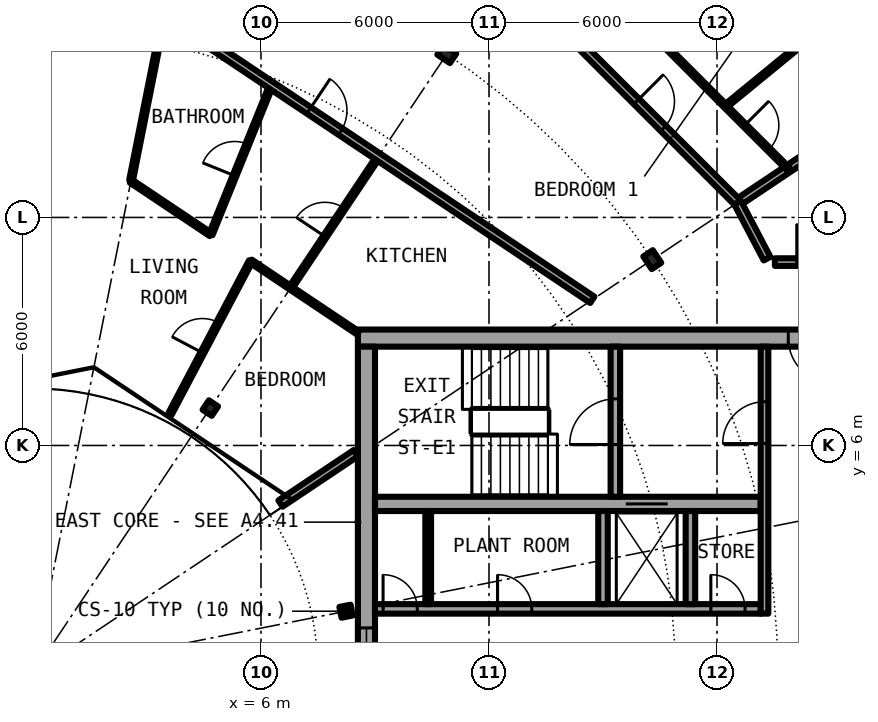
"""IFC4 building model, lengths in metres.
Left out: names, types, materials, properties, quantities, classifications, styles, units other than length and angle.
Written with IfcOpenShell. Run it as: python <this file> out.ifc"""

import sys

from ifc_helpers import new_model, si_unit, direction, frame, frame_2d, origin, origin_2d, place, context, subcontext, project, spatial, rectangle, i_section, extrude, element, fill, save


model = new_model("IFC4")
c1 = context("Model", 3, precision=1e-05, world=origin(), true_north=direction((0.0, 1.0)))
c2 = subcontext(c1, "Body", "Model", "MODEL_VIEW")
j1 = project(units=[si_unit("LENGTHUNIT", "METRE"), si_unit("PLANEANGLEUNIT", "RADIAN")], contexts=[c1])
p1 = place(None, origin())
s1 = spatial("IfcSite", under=j1, at=p1, CompositionType="ELEMENT")
p2 = place(p1, origin())
s2 = spatial("IfcBuilding", under=s1, at=p2, CompositionType="ELEMENT")
p3 = place(p2, frame((0.0, 0.0, 218.8)))
s3 = spatial("IfcBuildingStorey", under=s2, at=p3, CompositionType="ELEMENT", Elevation=218.8)
for number, where, z_axis, x_axis in (
    (1, (16.297, 10.889, 0.0), (0.0, 0.0, 1.0), (0.831, 0.556, 0.0)),
    (2, (10.889, 16.297, 0.0), (0.0, 0.0, 1.0), (0.556, 0.831, 0.0)),
):
    element("IfcColumn", number, at=place(p3, frame(where, z_axis=z_axis, x_axis=x_axis)), inside=s3, PredefinedType="COLUMN", context=c2, shape_type="SweptSolid", body=[
        extrude(i_section(OverallWidth=0.3, OverallDepth=0.4, WebThickness=0.013, FlangeThickness=0.024, FilletRadius=0.027, at=origin_2d()), origin(), (0.0, 0.0, 1.0), 3.05),
    ])
for number, where, z_axis, x_axis in (
    (3, (8.239, 1.639, 0.0), (0.0, 0.0, 1.0), (0.981, 0.195, 0.0)),
    (4, (4.667, 6.984, 0.0), (0.0, 0.0, 1.0), (0.556, 0.831, 0.0)),
):
    element("IfcColumn", number, at=place(p3, frame(where, z_axis=z_axis, x_axis=x_axis)), inside=s3, PredefinedType="COLUMN", context=c2, shape_type="SweptSolid", body=[
        extrude(i_section(OverallWidth=0.3, OverallDepth=0.29, WebThickness=0.009, FlangeThickness=0.014, FilletRadius=0.027, at=origin_2d()), origin(), (0.0, 0.0, 1.0), 3.05),
    ])
p4 = place(p3, frame((22.699, 15.167, 0.0), z_axis=(0.0, 0.0, 1.0), x_axis=(-0.634382322723, 0.773019449054, 0.0)))
e5 = element("IfcWall", 5, at=p4, inside=s3, PredefinedType="SOLIDWALL", context=c2, shape_type="SweptSolid", body=[
    extrude(rectangle(XDim=5.352, YDim=0.25, at=frame_2d((2.676, 0.0))), origin(), (0.0, 0.0, 1.0), 2.65),
])
p5 = place(p4, frame((0.841, 0.0, 0.0)))
e6 = element("IfcOpeningElement", 6, at=p5, cuts=e5, PredefinedType="OPENING", context=c2, shape_type="SweptSolid", body=[
    extrude(rectangle(XDim=1.0, YDim=2.2, at=frame_2d((0.5, 1.1))), frame((0.0, 0.135, 0.0), z_axis=(0.0, -1.0, 0.0), x_axis=(1.0, 0.0, 0.0)), (0.0, 0.0, 1.0), 0.27),
])
p6 = place(p4, frame((3.111, 0.0, 0.3)))
e7 = element("IfcOpeningElement", 7, at=p6, cuts=e5, PredefinedType="OPENING", context=c2, shape_type="SweptSolid", body=[
    extrude(rectangle(XDim=1.8, YDim=2.1, at=frame_2d((0.9, 1.05))), frame((0.0, 0.135, 0.0), z_axis=(0.0, -1.0, 0.0), x_axis=(1.0, 0.0, 0.0)), (0.0, 0.0, 1.0), 0.27),
])
p7 = place(p3, frame((22.05, 8.825, 0.0), z_axis=(0.0, 0.0, 1.0), x_axis=(-1.0, 0.0, 0.0)))
e8 = element("IfcWall", 8, at=p7, inside=s3, PredefinedType="SHEAR", context=c2, shape_type="SweptSolid", body=[
    extrude(rectangle(XDim=13.5, YDim=0.45, at=frame_2d((6.75, 0.0))), origin(), (0.0, 0.0, 1.0), 3.05),
])
p8 = place(p7, frame((0.975, 0.0, 0.0)))
e9 = element("IfcOpeningElement", 9, at=p8, cuts=e8, PredefinedType="OPENING", context=c2, shape_type="SweptSolid", body=[
    extrude(rectangle(XDim=1.2, YDim=2.3, at=frame_2d((0.6, 1.15))), frame((0.0, 0.235, 0.0), z_axis=(0.0, -1.0, 0.0), x_axis=(1.0, 0.0, 0.0)), (0.0, 0.0, 1.0), 0.47),
])
p9 = place(p3, frame((8.775, -8.6, 0.0), z_axis=(0.0, 0.0, 1.0), x_axis=(0.0, 1.0, 0.0)))
e10 = element("IfcWall", 10, at=p9, inside=s3, PredefinedType="SHEAR", context=c2, shape_type="SweptSolid", body=[
    extrude(rectangle(XDim=17.2, YDim=0.45, at=frame_2d((8.6, 0.0))), origin(), (0.0, 0.0, 1.0), 3.05),
])
p10 = place(p9, frame((7.4, 0.0, 0.1)))
e11 = element("IfcOpeningElement", 11, at=p10, cuts=e10, PredefinedType="OPENING", context=c2, shape_type="SweptSolid", body=[
    extrude(rectangle(XDim=2.4, YDim=2.2, at=frame_2d((1.2, 1.1))), frame((0.0, 0.235, 0.0), z_axis=(0.0, -1.0, 0.0), x_axis=(1.0, 0.0, 0.0)), (0.0, 0.0, 1.0), 0.47),
])
p11 = place(p3, frame((9.0, 1.7, 0.0), z_axis=(0.0, 0.0, 1.0), x_axis=(1.0, 0.0, 0.0)))
e12 = element("IfcWall", 12, at=p11, inside=s3, PredefinedType="SHEAR", context=c2, shape_type="SweptSolid", body=[
    extrude(rectangle(XDim=10.15, YDim=0.25, at=frame_2d((5.075, 0.0))), origin(), (0.0, 0.0, 1.0), 3.05),
])
p12 = place(p11, frame((0.212, 0.0, 0.0)))
e13 = element("IfcOpeningElement", 13, at=p12, cuts=e12, PredefinedType="OPENING", context=c2, shape_type="SweptSolid", body=[
    extrude(rectangle(XDim=0.9, YDim=2.3, at=frame_2d((0.45, 1.15))), frame((0.0, 0.135, 0.0), z_axis=(0.0, -1.0, 0.0), x_axis=(1.0, 0.0, 0.0)), (0.0, 0.0, 1.0), 0.27),
])
p13 = place(p11, frame((3.225, 0.0, 0.0)))
e14 = element("IfcOpeningElement", 14, at=p13, cuts=e12, PredefinedType="OPENING", context=c2, shape_type="SweptSolid", body=[
    extrude(rectangle(XDim=0.9, YDim=2.3, at=frame_2d((0.45, 1.15))), frame((0.0, 0.135, 0.0), z_axis=(0.0, -1.0, 0.0), x_axis=(1.0, 0.0, 0.0)), (0.0, 0.0, 1.0), 0.27),
])
p14 = place(p11, frame((8.837, 0.0, 0.0)))
e15 = element("IfcOpeningElement", 15, at=p14, cuts=e12, PredefinedType="OPENING", context=c2, shape_type="SweptSolid", body=[
    extrude(rectangle(XDim=0.9, YDim=2.3, at=frame_2d((0.45, 1.15))), frame((0.0, 0.135, 0.0), z_axis=(0.0, -1.0, 0.0), x_axis=(1.0, 0.0, 0.0)), (0.0, 0.0, 1.0), 0.27),
])
p15 = place(p3, frame((9.0, 4.462, 0.0), z_axis=(0.0, 0.0, 1.0), x_axis=(1.0, 0.0, 0.0)))
e16 = element("IfcWall", 16, at=p15, inside=s3, PredefinedType="SHEAR", context=c2, shape_type="SweptSolid", body=[
    extrude(rectangle(XDim=10.15, YDim=0.375, at=frame_2d((5.075, 0.0))), origin(), (0.0, 0.0, 1.0), 3.05),
])
p16 = place(p15, frame((6.6, 0.0, 0.0)))
e17 = element("IfcOpeningElement", 17, at=p16, cuts=e16, PredefinedType="OPENING", context=c2, shape_type="SweptSolid", body=[
    extrude(rectangle(XDim=1.1, YDim=2.3, at=frame_2d((0.55, 1.15))), frame((0.0, 0.198, 0.0), z_axis=(0.0, -1.0, 0.0), x_axis=(1.0, 0.0, 0.0)), (0.0, 0.0, 1.0), 0.395),
])
p17 = place(p3, frame((15.325, 4.65, 0.0), z_axis=(0.0, 0.0, 1.0), x_axis=(0.0, 1.0, 0.0)))
e18 = element("IfcWall", 18, at=p17, inside=s3, PredefinedType="SHEAR", context=c2, shape_type="SweptSolid", body=[
    extrude(rectangle(XDim=3.95, YDim=0.25, at=frame_2d((1.975, 0.0))), origin(), (0.0, 0.0, 1.0), 3.05),
])
p18 = place(p17, frame((1.375, 0.0, 0.0)))
e19 = element("IfcOpeningElement", 19, at=p18, cuts=e18, PredefinedType="OPENING", context=c2, shape_type="SweptSolid", body=[
    extrude(rectangle(XDim=1.2, YDim=2.3, at=frame_2d((0.6, 1.15))), frame((0.0, 0.135, 0.0), z_axis=(0.0, -1.0, 0.0), x_axis=(1.0, 0.0, 0.0)), (0.0, 0.0, 1.0), 0.27),
])
for number, where, z_axis, x_axis in (
    (20, (15.0, 1.825, 0.0), (0.0, 0.0, 1.0), (0.0, 1.0, 0.0)),
    (21, (17.3, 1.825, 0.0), (0.0, 0.0, 1.0), (0.0, 1.0, 0.0)),
):
    element("IfcWall", number, at=place(p3, frame(where, z_axis=z_axis, x_axis=x_axis)), inside=s3, PredefinedType="SOLIDWALL", context=c2, shape_type="SweptSolid", body=[
        extrude(rectangle(XDim=2.45, YDim=0.25, at=frame_2d((1.225, 0.0))), origin(), (0.0, 0.0, 1.0), 2.65),
    ])
p19 = place(p3, frame((19.25, 1.575, 0.0), z_axis=(0.0, 0.0, 1.0), x_axis=(0.0, 1.0, 0.0)))
e22 = element("IfcWall", 22, at=p19, inside=s3, PredefinedType="SOLIDWALL", context=c2, shape_type="SweptSolid", body=[
    extrude(rectangle(XDim=7.025, YDim=0.2, at=frame_2d((3.513, 0.0))), origin(), (0.0, 0.0, 1.0), 2.65),
])
p20 = place(p19, frame((4.475, 0.0, 0.0)))
e23 = element("IfcOpeningElement", 23, at=p20, cuts=e22, PredefinedType="OPENING", context=c2, shape_type="SweptSolid", body=[
    extrude(rectangle(XDim=1.1, YDim=2.3, at=frame_2d((0.55, 1.15))), frame((0.0, 0.11, 0.0), z_axis=(0.0, -1.0, 0.0), x_axis=(1.0, 0.0, 0.0)), (0.0, 0.0, 1.0), 0.22),
])
p21 = place(p3, frame((10.4, 1.825, 0.0), z_axis=(0.0, 0.0, 1.0), x_axis=(0.0, 1.0, 0.0)))
e24 = element("IfcWall", 24, at=p21, inside=s3, PredefinedType="PARTITIONING", context=c2, shape_type="SweptSolid", body=[
    extrude(rectangle(XDim=2.45, YDim=0.15, at=frame_2d((1.225, 0.0))), origin(), (0.0, 0.0, 1.0), 2.65),
])
p22 = place(p3, frame((3.605, 6.827, 0.0), z_axis=(0.0, 0.0, 1.0), x_axis=(0.466962677975, 0.884277025246, 0.0)))
e25 = element("IfcWall", 25, at=p22, inside=s3, PredefinedType="PARTITIONING", context=c2, shape_type="SweptSolid", body=[
    extrude(rectangle(XDim=4.549, YDim=0.1, at=frame_2d((2.274, 0.0))), origin(), (0.0, 0.0, 1.0), 2.65),
])
p23 = place(p22, frame((1.824, 0.0, 0.0)))
e26 = element("IfcOpeningElement", 26, at=p23, cuts=e25, PredefinedType="OPENING", context=c2, shape_type="SweptSolid", body=[
    extrude(rectangle(XDim=0.9, YDim=2.3, at=frame_2d((0.45, 1.15))), frame((0.0, 0.06, 0.0), z_axis=(0.0, -1.0, 0.0), x_axis=(1.0, 0.0, 0.0)), (0.0, 0.0, 1.0), 0.12),
])
p24 = place(p3, frame((4.678, 11.551, 0.0), z_axis=(0.0, 0.0, 1.0), x_axis=(0.375509828455, 0.926818411952, 0.0)))
e27 = element("IfcWall", 27, at=p24, inside=s3, PredefinedType="PARTITIONING", context=c2, shape_type="SweptSolid", body=[
    extrude(rectangle(XDim=4.237, YDim=0.1, at=frame_2d((2.119, 0.0))), origin(), (0.0, 0.0, 1.0), 2.65),
])
p25 = place(p24, frame((1.669, 0.0, 0.0)))
e28 = element("IfcOpeningElement", 28, at=p25, cuts=e27, PredefinedType="OPENING", context=c2, shape_type="SweptSolid", body=[
    extrude(rectangle(XDim=0.9, YDim=2.3, at=frame_2d((0.45, 1.15))), frame((0.0, 0.06, 0.0), z_axis=(0.0, -1.0, 0.0), x_axis=(1.0, 0.0, 0.0)), (0.0, 0.0, 1.0), 0.12),
])
p26 = place(p3, frame((6.78, 10.147, 0.0), z_axis=(0.0, 0.0, 1.0), x_axis=(0.555528237031, 0.831497671591, 0.0)))
e29 = element("IfcWall", 29, at=p26, inside=s3, PredefinedType="PARTITIONING", context=c2, shape_type="SweptSolid", body=[
    extrude(rectangle(XDim=4.149, YDim=0.1, at=frame_2d((2.075, 0.0))), origin(), (0.0, 0.0, 1.0), 2.65),
])
p27 = place(p26, frame((1.625, 0.0, 0.0)))
e30 = element("IfcOpeningElement", 30, at=p27, cuts=e29, PredefinedType="OPENING", context=c2, shape_type="SweptSolid", body=[
    extrude(rectangle(XDim=0.9, YDim=2.3, at=frame_2d((0.45, 1.15))), frame((0.0, 0.06, 0.0), z_axis=(0.0, -1.0, 0.0), x_axis=(1.0, 0.0, 0.0)), (0.0, 0.0, 1.0), 0.12),
])
p28 = place(p3, frame((18.224, 14.927, 0.0), z_axis=(0.0, 0.0, 1.0), x_axis=(0.773548271597, 0.633737383709, 0.0)))
e31 = element("IfcWall", 31, at=p28, inside=s3, PredefinedType="PARTITIONING", context=c2, shape_type="SweptSolid", body=[
    extrude(rectangle(XDim=3.618, YDim=0.1, at=frame_2d((1.809, 0.0))), origin(), (0.0, 0.0, 1.0), 2.65),
])
p29 = place(p3, frame((18.542, 12.389, 0.0), z_axis=(0.0, 0.0, 1.0), x_axis=(0.831387096605, 0.55569370664, 0.0)))
e32 = element("IfcWall", 32, at=p29, inside=s3, PredefinedType="PARTITIONING", context=c2, shape_type="SweptSolid", body=[
    extrude(rectangle(XDim=4.875, YDim=0.2, at=frame_2d((2.438, 0.0))), origin(), (0.0, 0.0, 1.0), 2.65),
])
p30 = place(p3, frame((6.513, 4.472, 0.0), z_axis=(0.0, 0.0, 1.0), x_axis=(0.831403409976, 0.555669299026, 0.0)))
e33 = element("IfcWall", 33, at=p30, inside=s3, PredefinedType="PARTITIONING", context=c2, shape_type="SweptSolid", body=[
    extrude(rectangle(XDim=2.383, YDim=0.2, at=frame_2d((1.191, 0.0))), origin(), (0.0, 0.0, 1.0), 2.65),
])
p31 = place(p3, frame((19.523, 10.825, 0.0), z_axis=(0.0, 0.0, 1.0), x_axis=(1.0, 0.0, 0.0)))
e34 = element("IfcWall", 34, at=p31, inside=s3, PredefinedType="PARTITIONING", context=c2, shape_type="SweptSolid", body=[
    extrude(rectangle(XDim=2.152, YDim=0.2, at=frame_2d((1.076, 0.0))), origin(), (0.0, 0.0, 1.0), 2.65),
])
p32 = place(p31, frame((0.576, 0.0, 0.0)))
e35 = element("IfcOpeningElement", 35, at=p32, cuts=e34, PredefinedType="OPENING", context=c2, shape_type="SweptSolid", body=[
    extrude(rectangle(XDim=1.0, YDim=2.3, at=frame_2d((0.5, 1.15))), frame((0.0, 0.11, 0.0), z_axis=(0.0, -1.0, 0.0), x_axis=(1.0, 0.0, 0.0)), (0.0, 0.0, 1.0), 0.22),
])
p33 = place(p3, frame((2.577, 12.955, 0.0), z_axis=(0.0, 0.0, 1.0), x_axis=(0.831440395268, -0.555613956912, 0.0)))
e36 = element("IfcWall", 36, at=p33, inside=s3, PredefinedType="PARTITIONING", context=c2, shape_type="SweptSolid", body=[
    extrude(rectangle(XDim=2.527, YDim=0.1, at=frame_2d((1.264, 0.0))), origin(), (0.0, 0.0, 1.0), 2.65),
])
p34 = place(p3, frame((5.729, 10.849, 0.0), z_axis=(0.0, 0.0, 1.0), x_axis=(0.83129689803, -0.555828631257, 0.0)))
e37 = element("IfcWall", 37, at=p34, inside=s3, PredefinedType="PARTITIONING", context=c2, shape_type="SweptSolid", body=[
    extrude(rectangle(XDim=3.394, YDim=0.1, at=frame_2d((1.697, 0.0))), origin(), (0.0, 0.0, 1.0), 2.65),
])
p35 = place(p3, frame((3.453, 17.36, 0.0), z_axis=(0.0, 0.0, 1.0), x_axis=(0.831437137577, -0.555618831806, 0.0)))
e38 = element("IfcWall", 38, at=p35, inside=s3, PredefinedType="PARTITIONING", context=c2, shape_type="SweptSolid", body=[
    extrude(rectangle(XDim=13.549, YDim=0.2, at=frame_2d((6.774, 0.0))), origin(), (0.0, 0.0, 1.0), 2.65),
])
p36 = place(p35, frame((4.581, 0.0, 0.0)))
e39 = element("IfcOpeningElement", 39, at=p36, cuts=e38, PredefinedType="OPENING", context=c2, shape_type="SweptSolid", body=[
    extrude(rectangle(XDim=1.0, YDim=2.3, at=frame_2d((0.5, 1.15))), frame((0.0, 0.11, 0.0), z_axis=(0.0, -1.0, 0.0), x_axis=(1.0, 0.0, 0.0)), (0.0, 0.0, 1.0), 0.22),
])
p37 = place(p3, frame((12.389, 18.542, 0.0), z_axis=(0.0, 0.0, 1.0), x_axis=(0.707106781187, -0.707106781187, 0.0)))
e40 = element("IfcWall", 40, at=p37, inside=s3, PredefinedType="PARTITIONING", context=c2, shape_type="SweptSolid", body=[
    extrude(rectangle(XDim=8.702, YDim=0.2, at=frame_2d((4.351, 0.0))), origin(), (0.0, 0.0, 1.0), 2.65),
])
p38 = place(p37, frame((4.938, 0.0, 0.0)))
e41 = element("IfcOpeningElement", 41, at=p38, cuts=e40, PredefinedType="OPENING", context=c2, shape_type="SweptSolid", body=[
    extrude(rectangle(XDim=1.0, YDim=2.3, at=frame_2d((0.5, 1.15))), frame((0.0, 0.11, 0.0), z_axis=(0.0, -1.0, 0.0), x_axis=(1.0, 0.0, 0.0)), (0.0, 0.0, 1.0), 0.22),
])
p39 = place(p3, frame((18.542, 12.389, 0.0), z_axis=(0.0, 0.0, 1.0), x_axis=(0.465359652486, -0.885121683068, 0.0)))
e42 = element("IfcWall", 42, at=p39, inside=s3, PredefinedType="PARTITIONING", context=c2, shape_type="SweptSolid", body=[
    extrude(rectangle(XDim=1.665, YDim=0.2, at=frame_2d((0.833, 0.0))), origin(), (0.0, 0.0, 1.0), 2.65),
])
p40 = place(p3, frame((16.575, 16.575, 0.0), z_axis=(0.0, 0.0, 1.0), x_axis=(0.707132961115, -0.707080600289, 0.0)))
e43 = element("IfcWall", 43, at=p40, inside=s3, PredefinedType="PARTITIONING", context=c2, shape_type="SweptSolid", body=[
    extrude(rectangle(XDim=4.663, YDim=0.1, at=frame_2d((2.331, 0.0))), origin(), (0.0, 0.0, 1.0), 2.65),
])
p41 = place(p40, frame((3.043, 0.0, 0.0)))
e44 = element("IfcOpeningElement", 44, at=p41, cuts=e43, PredefinedType="OPENING", context=c2, shape_type="SweptSolid", body=[
    extrude(rectangle(XDim=0.9, YDim=2.3, at=frame_2d((0.45, 1.15))), frame((0.0, 0.06, 0.0), z_axis=(0.0, -1.0, 0.0), x_axis=(1.0, 0.0, 0.0)), (0.0, 0.0, 1.0), 0.12),
])
p42 = place(p3, frame((2.581, 12.976, 0.0), z_axis=(0.0, 0.0, 1.0), x_axis=(0.195102838171, 0.980782790702, 0.0)))
e45 = element("IfcWall", 45, at=p42, inside=s3, PredefinedType="PARTITIONING", context=c2, shape_type="SweptSolid", body=[
    extrude(rectangle(XDim=4.448, YDim=0.1, at=frame_2d((2.224, 0.0))), origin(), (0.0, 0.0, 1.0), 2.65),
])
p43 = place(p16, origin())
e46 = element("IfcDoor", 46, at=p43, inside=s3, OperationType="DOUBLE_DOOR_SLIDING", PredefinedType="DOOR", context=c2, shape_type="SweptSolid", body=[
    extrude(rectangle(XDim=1.1, YDim=2.3, at=frame_2d((0.55, 1.15))), frame((0.0, 0.025, 0.0), z_axis=(0.0, -1.0, 0.0), x_axis=(1.0, 0.0, 0.0)), (0.0, 0.0, 1.0), 0.05),
])
fill(e17, e46)
p44 = place(p12, origin())
e47 = element("IfcDoor", 47, at=p44, inside=s3, OperationType="SINGLE_SWING_RIGHT", PredefinedType="DOOR", context=c2, shape_type="SweptSolid", body=[
    extrude(rectangle(XDim=0.9, YDim=2.3, at=frame_2d((0.45, 1.15))), frame((0.0, 0.025, 0.0), z_axis=(0.0, -1.0, 0.0), x_axis=(1.0, 0.0, 0.0)), (0.0, 0.0, 1.0), 0.05),
])
fill(e13, e47)
p45 = place(p13, origin())
e48 = element("IfcDoor", 48, at=p45, inside=s3, OperationType="SINGLE_SWING_RIGHT", PredefinedType="DOOR", context=c2, shape_type="SweptSolid", body=[
    extrude(rectangle(XDim=0.9, YDim=2.3, at=frame_2d((0.45, 1.15))), frame((0.0, 0.025, 0.0), z_axis=(0.0, -1.0, 0.0), x_axis=(1.0, 0.0, 0.0)), (0.0, 0.0, 1.0), 0.05),
])
fill(e14, e48)
p46 = place(p14, origin())
e49 = element("IfcDoor", 49, at=p46, inside=s3, OperationType="SINGLE_SWING_LEFT", PredefinedType="DOOR", context=c2, shape_type="SweptSolid", body=[
    extrude(rectangle(XDim=0.9, YDim=2.3, at=frame_2d((0.45, 1.15))), frame((0.0, 0.025, 0.0), z_axis=(0.0, -1.0, 0.0), x_axis=(1.0, 0.0, 0.0)), (0.0, 0.0, 1.0), 0.05),
])
fill(e15, e49)
p47 = place(p18, origin())
e50 = element("IfcDoor", 50, at=p47, inside=s3, OperationType="SINGLE_SWING_LEFT", PredefinedType="DOOR", context=c2, shape_type="SweptSolid", body=[
    extrude(rectangle(XDim=1.2, YDim=2.3, at=frame_2d((0.6, 1.15))), frame((0.0, 0.025, 0.0), z_axis=(0.0, -1.0, 0.0), x_axis=(1.0, 0.0, 0.0)), (0.0, 0.0, 1.0), 0.05),
])
fill(e19, e50)
p48 = place(p20, origin())
e51 = element("IfcDoor", 51, at=p48, inside=s3, OperationType="SINGLE_SWING_LEFT", PredefinedType="DOOR", context=c2, shape_type="SweptSolid", body=[
    extrude(rectangle(XDim=1.1, YDim=2.3, at=frame_2d((0.55, 1.15))), frame((0.0, 0.025, 0.0), z_axis=(0.0, -1.0, 0.0), x_axis=(1.0, 0.0, 0.0)), (0.0, 0.0, 1.0), 0.05),
])
fill(e23, e51)
p49 = place(p8, origin())
e52 = element("IfcDoor", 52, at=p49, inside=s3, OperationType="SINGLE_SWING_RIGHT", PredefinedType="DOOR", context=c2, shape_type="SweptSolid", body=[
    extrude(rectangle(XDim=1.2, YDim=2.3, at=frame_2d((0.6, 1.15))), frame((0.0, 0.025, 0.0), z_axis=(0.0, -1.0, 0.0), x_axis=(1.0, 0.0, 0.0)), (0.0, 0.0, 1.0), 0.05),
])
fill(e9, e52)
p50 = place(p10, origin())
e53 = element("IfcWindow", 53, at=p50, inside=s3, PartitioningType="SINGLE_PANEL", PredefinedType="WINDOW", context=c2, shape_type="SweptSolid", body=[
    extrude(rectangle(XDim=2.4, YDim=2.2, at=frame_2d((1.2, 1.1))), frame((0.0, 0.03, 0.0), z_axis=(0.0, -1.0, 0.0), x_axis=(1.0, 0.0, 0.0)), (0.0, 0.0, 1.0), 0.06),
])
fill(e11, e53)
p51 = place(p38, origin())
e54 = element("IfcDoor", 54, at=p51, inside=s3, OperationType="SINGLE_SWING_RIGHT", PredefinedType="DOOR", context=c2, shape_type="SweptSolid", body=[
    extrude(rectangle(XDim=1.0, YDim=2.3, at=frame_2d((0.5, 1.15))), frame((0.0, 0.025, 0.0), z_axis=(0.0, -1.0, 0.0), x_axis=(1.0, 0.0, 0.0)), (0.0, 0.0, 1.0), 0.05),
])
fill(e41, e54)
p52 = place(p41, origin())
e55 = element("IfcDoor", 55, at=p52, inside=s3, OperationType="SINGLE_SWING_RIGHT", PredefinedType="DOOR", context=c2, shape_type="SweptSolid", body=[
    extrude(rectangle(XDim=0.9, YDim=2.3, at=frame_2d((0.45, 1.15))), frame((0.0, 0.025, 0.0), z_axis=(0.0, -1.0, 0.0), x_axis=(1.0, 0.0, 0.0)), (0.0, 0.0, 1.0), 0.05),
])
fill(e44, e55)
p53 = place(p36, origin())
e56 = element("IfcDoor", 56, at=p53, inside=s3, OperationType="SINGLE_SWING_LEFT", PredefinedType="DOOR", context=c2, shape_type="SweptSolid", body=[
    extrude(rectangle(XDim=1.0, YDim=2.3, at=frame_2d((0.5, 1.15))), frame((0.0, 0.025, 0.0), z_axis=(0.0, -1.0, 0.0), x_axis=(1.0, 0.0, 0.0)), (0.0, 0.0, 1.0), 0.05),
])
fill(e39, e56)
p54 = place(p25, origin())
e57 = element("IfcDoor", 57, at=p54, inside=s3, OperationType="SINGLE_SWING_RIGHT", PredefinedType="DOOR", context=c2, shape_type="SweptSolid", body=[
    extrude(rectangle(XDim=0.9, YDim=2.3, at=frame_2d((0.45, 1.15))), frame((0.0, 0.025, 0.0), z_axis=(0.0, -1.0, 0.0), x_axis=(1.0, 0.0, 0.0)), (0.0, 0.0, 1.0), 0.05),
])
fill(e28, e57)
p55 = place(p27, origin())
e58 = element("IfcDoor", 58, at=p55, inside=s3, OperationType="SINGLE_SWING_RIGHT", PredefinedType="DOOR", context=c2, shape_type="SweptSolid", body=[
    extrude(rectangle(XDim=0.9, YDim=2.3, at=frame_2d((0.45, 1.15))), frame((0.0, 0.025, 0.0), z_axis=(0.0, -1.0, 0.0), x_axis=(1.0, 0.0, 0.0)), (0.0, 0.0, 1.0), 0.05),
])
fill(e30, e58)
p56 = place(p23, origin())
e59 = element("IfcDoor", 59, at=p56, inside=s3, OperationType="SINGLE_SWING_LEFT", PredefinedType="DOOR", context=c2, shape_type="SweptSolid", body=[
    extrude(rectangle(XDim=0.9, YDim=2.3, at=frame_2d((0.45, 1.15))), frame((0.0, 0.025, 0.0), z_axis=(0.0, -1.0, 0.0), x_axis=(1.0, 0.0, 0.0)), (0.0, 0.0, 1.0), 0.05),
])
fill(e26, e59)
p57 = place(p32, origin())
e60 = element("IfcDoor", 60, at=p57, inside=s3, OperationType="SINGLE_SWING_LEFT", PredefinedType="DOOR", context=c2, shape_type="SweptSolid", body=[
    extrude(rectangle(XDim=1.0, YDim=2.3, at=frame_2d((0.5, 1.15))), frame((0.0, 0.025, 0.0), z_axis=(0.0, -1.0, 0.0), x_axis=(1.0, 0.0, 0.0)), (0.0, 0.0, 1.0), 0.05),
])
fill(e35, e60)
save(model, sys.argv[1])
